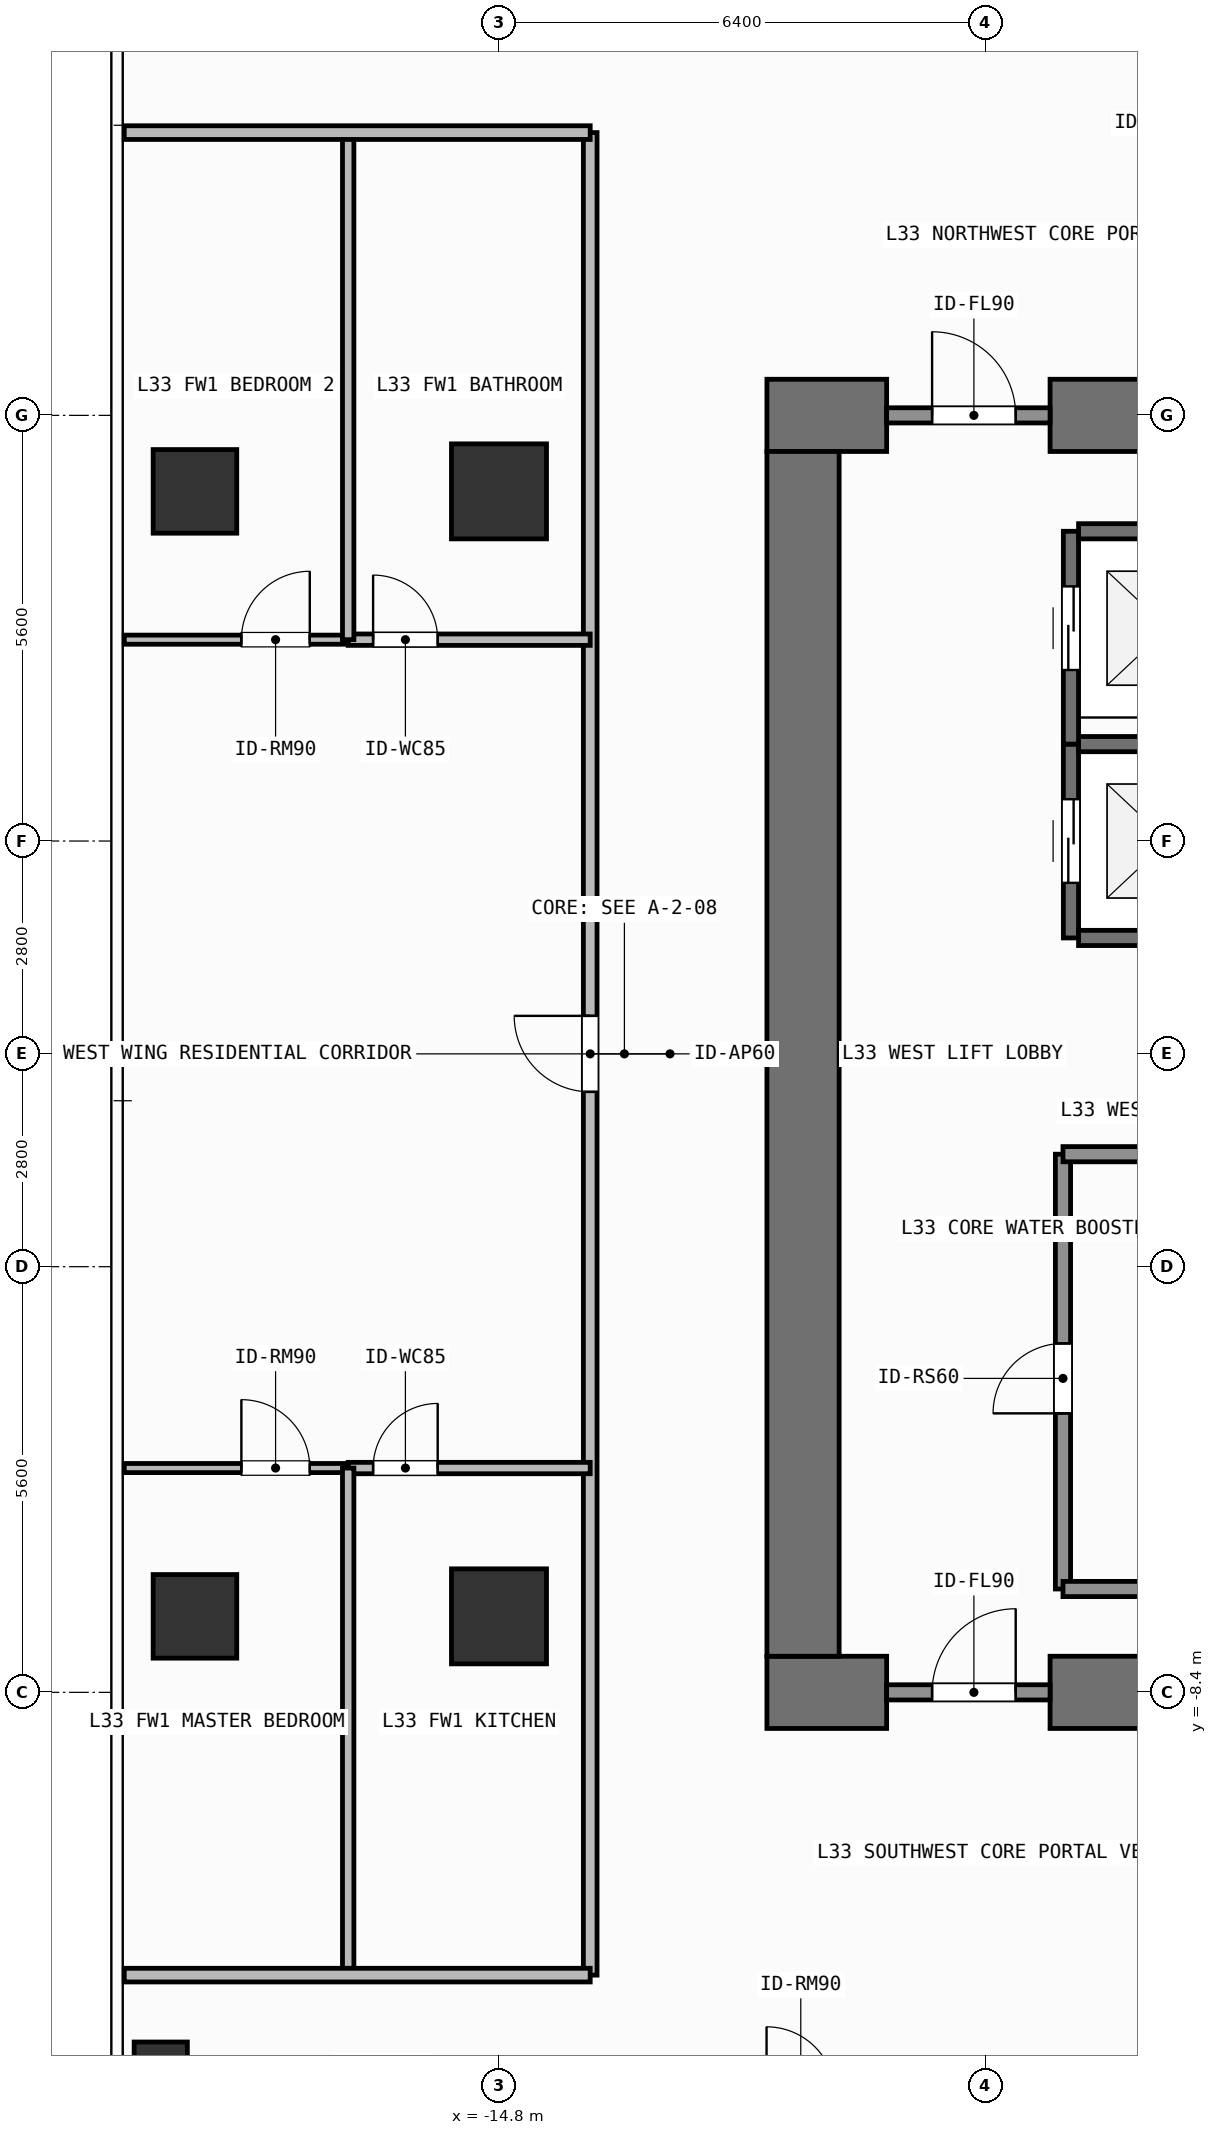
"""IFC4 building model, lengths in metres.
Left out: names, types, materials, properties, quantities, classifications, styles, units other than length and angle.
Written with IfcOpenShell. Run it as: python <this file> out.ifc"""

import sys

from ifc_helpers import new_model, si_unit, direction, frame, frame_2d, origin, origin_2d, place, context, subcontext, project, spatial, rectangle, hollow_rectangle, extrude, element, fill, save


model = new_model("IFC4")
c1 = context("Model", 3, precision=1e-05, world=origin(), true_north=direction((0.0, 1.0)))
c2 = subcontext(c1, "Body", "Model", "MODEL_VIEW")
j1 = project(units=[si_unit("LENGTHUNIT", "METRE"), si_unit("PLANEANGLEUNIT", "RADIAN")], contexts=[c1])
p1 = place(None, origin())
s1 = spatial("IfcSite", under=j1, at=p1, CompositionType="ELEMENT")
p2 = place(p1, origin())
s2 = spatial("IfcBuilding", under=s1, at=p2, CompositionType="ELEMENT")
p3 = place(p2, frame((0.0, 0.0, 132.9)))
s3 = spatial("IfcBuildingStorey", under=s2, at=p3, CompositionType="ELEMENT", Elevation=132.9)
p4 = place(p3, frame((-11.275, -8.4, 0.0), z_axis=(0.0, 0.0, 1.0), x_axis=(1.0, 0.0, 0.0)))
e1 = element("IfcWall", 1, at=p4, inside=s3, PredefinedType="SHEAR", context=c2, shape_type="SweptSolid", body=[
    extrude(rectangle(XDim=1.575, YDim=0.95, at=frame_2d((0.788, 0.0))), origin(), (0.0, 0.0, 1.0), 3.9),
])
p5 = place(p3, frame((-7.55, -8.4, 0.0), z_axis=(0.0, 0.0, 1.0), x_axis=(1.0, 0.0, 0.0)))
e2 = element("IfcWall", 2, at=p5, inside=s3, PredefinedType="SHEAR", context=c2, shape_type="SweptSolid", body=[
    extrude(rectangle(XDim=3.35, YDim=0.95, at=frame_2d((1.675, 0.0))), origin(), (0.0, 0.0, 1.0), 3.9),
])
p6 = place(p3, frame((-11.275, 8.4, 0.0), z_axis=(0.0, 0.0, 1.0), x_axis=(1.0, 0.0, 0.0)))
e3 = element("IfcWall", 3, at=p6, inside=s3, PredefinedType="SHEAR", context=c2, shape_type="SweptSolid", body=[
    extrude(rectangle(XDim=1.575, YDim=0.95, at=frame_2d((0.788, 0.0))), origin(), (0.0, 0.0, 1.0), 3.9),
])
p7 = place(p3, frame((-7.55, 8.4, 0.0), z_axis=(0.0, 0.0, 1.0), x_axis=(1.0, 0.0, 0.0)))
e4 = element("IfcWall", 4, at=p7, inside=s3, PredefinedType="SHEAR", context=c2, shape_type="SweptSolid", body=[
    extrude(rectangle(XDim=16.425, YDim=0.95, at=frame_2d((8.212, 0.0))), origin(), (0.0, 0.0, 1.0), 3.9),
])
p8 = place(p3, frame((-10.8, -7.925, 0.0), z_axis=(0.0, 0.0, 1.0), x_axis=(0.0, 1.0, 0.0)))
e5 = element("IfcWall", 5, at=p8, inside=s3, PredefinedType="SHEAR", context=c2, shape_type="SweptSolid", body=[
    extrude(rectangle(XDim=15.85, YDim=0.95, at=frame_2d((7.925, 0.0))), origin(), (0.0, 0.0, 1.0), 3.9),
])
for number, where, z_axis, x_axis in (
    (6, (-14.8, -7.4, 0.0), (0.0, 0.0, 1.0), (1.0, 0.0, 0.0)),
    (7, (-14.8, 7.4, 0.0), (0.0, 0.0, 1.0), (1.0, 0.0, 0.0)),
):
    element("IfcColumn", number, at=place(p3, frame(where, z_axis=z_axis, x_axis=x_axis)), inside=s3, PredefinedType="COLUMN", context=c2, shape_type="SweptSolid", body=[
        extrude(rectangle(XDim=1.25, YDim=1.25, at=origin_2d()), origin(), (0.0, 0.0, 1.0), 3.9),
    ])
for number, where, z_axis, x_axis in (
    (8, (-18.8, -7.4, 0.0), (0.0, 0.0, 1.0), (1.0, 0.0, 0.0)),
    (9, (-18.8, 7.4, 0.0), (0.0, 0.0, 1.0), (1.0, 0.0, 0.0)),
):
    element("IfcColumn", number, at=place(p3, frame(where, z_axis=z_axis, x_axis=x_axis)), inside=s3, PredefinedType="COLUMN", context=c2, shape_type="SweptSolid", body=[
        extrude(rectangle(XDim=1.1, YDim=1.1, at=origin_2d()), origin(), (0.0, 0.0, 1.0), 3.9),
    ])
p9 = place(p3, frame((-19.25, -13.35, 0.0), z_axis=(0.0, 0.0, 1.0), x_axis=(1.0, 0.0, 0.0)))
e10 = element("IfcColumn", 10, at=p9, inside=s3, PredefinedType="COLUMN", context=c2, shape_type="SweptSolid", body=[
    extrude(hollow_rectangle(XDim=0.7, YDim=0.7, WallThickness=0.032, at=origin_2d()), origin(), (0.0, 0.0, 1.0), 3.9),
])
p10 = place(p3, frame((-7.275, 1.525, 0.0), z_axis=(0.0, 0.0, 1.0), x_axis=(0.0, 1.0, 0.0)))
e11 = element("IfcWall", 11, at=p10, inside=s3, PredefinedType="SHEAR", context=c2, shape_type="SweptSolid", body=[
    extrude(rectangle(XDim=2.55, YDim=0.2, at=frame_2d((1.275, 0.0))), origin(), (0.0, 0.0, 1.0), 3.62),
])
p11 = place(p10, frame((0.725, 0.0, 0.0)))
e12 = element("IfcOpeningElement", 12, at=p11, cuts=e11, PredefinedType="OPENING", context=c2, shape_type="SweptSolid", body=[
    extrude(rectangle(XDim=1.1, YDim=2.2, at=frame_2d((0.55, 1.1))), frame((0.0, 0.11, 0.0), z_axis=(0.0, -1.0, 0.0), x_axis=(1.0, 0.0, 0.0)), (0.0, 0.0, 1.0), 0.22),
])
for number, where, z_axis, x_axis in (
    (13, (-7.175, 1.525, 0.0), (0.0, 0.0, 1.0), (1.0, 0.0, 0.0)),
    (14, (-7.175, 4.075, 0.0), (0.0, 0.0, 1.0), (1.0, 0.0, 0.0)),
):
    element("IfcWall", number, at=place(p3, frame(where, z_axis=z_axis, x_axis=x_axis)), inside=s3, PredefinedType="SHEAR", context=c2, shape_type="SweptSolid", body=[
        extrude(rectangle(XDim=2.35, YDim=0.2, at=frame_2d((1.175, 0.0))), origin(), (0.0, 0.0, 1.0), 3.62),
    ])
p12 = place(p3, frame((-7.275, 4.075, 0.0), z_axis=(0.0, 0.0, 1.0), x_axis=(0.0, 1.0, 0.0)))
e15 = element("IfcWall", 15, at=p12, inside=s3, PredefinedType="SHEAR", context=c2, shape_type="SweptSolid", body=[
    extrude(rectangle(XDim=2.8, YDim=0.2, at=frame_2d((1.4, 0.0))), origin(), (0.0, 0.0, 1.0), 3.62),
])
p13 = place(p12, frame((0.975, 0.0, 0.0)))
e16 = element("IfcOpeningElement", 16, at=p13, cuts=e15, PredefinedType="OPENING", context=c2, shape_type="SweptSolid", body=[
    extrude(rectangle(XDim=1.1, YDim=2.2, at=frame_2d((0.55, 1.1))), frame((0.0, 0.11, 0.0), z_axis=(0.0, -1.0, 0.0), x_axis=(1.0, 0.0, 0.0)), (0.0, 0.0, 1.0), 0.22),
])
p14 = place(p3, frame((-7.175, 6.875, 0.0), z_axis=(0.0, 0.0, 1.0), x_axis=(1.0, 0.0, 0.0)))
e17 = element("IfcWall", 17, at=p14, inside=s3, PredefinedType="SHEAR", context=c2, shape_type="SweptSolid", body=[
    extrude(rectangle(XDim=2.35, YDim=0.2, at=frame_2d((1.175, 0.0))), origin(), (0.0, 0.0, 1.0), 3.62),
])
p15 = place(p3, frame((-9.7, -8.4, 0.0), z_axis=(0.0, 0.0, 1.0), x_axis=(1.0, 0.0, 0.0)))
e18 = element("IfcWall", 18, at=p15, inside=s3, PredefinedType="SOLIDWALL", context=c2, shape_type="SweptSolid", body=[
    extrude(rectangle(XDim=2.15, YDim=0.2, at=frame_2d((1.075, 0.0))), origin(), (0.0, 0.0, 1.0), 2.66),
])
p16 = place(p15, frame((0.598, 0.0, 0.0)))
e19 = element("IfcOpeningElement", 19, at=p16, cuts=e18, PredefinedType="OPENING", context=c2, shape_type="SweptSolid", body=[
    extrude(rectangle(XDim=1.1, YDim=2.15, at=frame_2d((0.55, 1.075))), frame((0.0, 0.11, 0.0), z_axis=(0.0, -1.0, 0.0), x_axis=(1.0, 0.0, 0.0)), (0.0, 0.0, 1.0), 0.22),
])
p17 = place(p3, frame((-9.7, 8.4, 0.0), z_axis=(0.0, 0.0, 1.0), x_axis=(1.0, 0.0, 0.0)))
e20 = element("IfcWall", 20, at=p17, inside=s3, PredefinedType="SOLIDWALL", context=c2, shape_type="SweptSolid", body=[
    extrude(rectangle(XDim=2.15, YDim=0.2, at=frame_2d((1.075, 0.0))), origin(), (0.0, 0.0, 1.0), 2.66),
])
p18 = place(p17, frame((0.598, 0.0, 0.0)))
e21 = element("IfcOpeningElement", 21, at=p18, cuts=e20, PredefinedType="OPENING", context=c2, shape_type="SweptSolid", body=[
    extrude(rectangle(XDim=1.1, YDim=2.15, at=frame_2d((0.55, 1.075))), frame((0.0, 0.11, 0.0), z_axis=(0.0, -1.0, 0.0), x_axis=(1.0, 0.0, 0.0)), (0.0, 0.0, 1.0), 0.22),
])
p19 = place(p3, frame((-7.38, -7.04, 0.0), z_axis=(0.0, 0.0, 1.0), x_axis=(0.0, 1.0, 0.0)))
e22 = element("IfcWall", 22, at=p19, inside=s3, PredefinedType="SOLIDWALL", context=c2, shape_type="SweptSolid", body=[
    extrude(rectangle(XDim=5.72, YDim=0.2, at=frame_2d((2.86, 0.0))), origin(), (0.0, 0.0, 1.0), 3.62),
])
p20 = place(p19, frame((2.31, 0.0, 0.0)))
e23 = element("IfcOpeningElement", 23, at=p20, cuts=e22, PredefinedType="OPENING", context=c2, shape_type="SweptSolid", body=[
    extrude(rectangle(XDim=0.92, YDim=2.1, at=frame_2d((0.46, 1.05))), frame((0.0, 0.11, 0.0), z_axis=(0.0, -1.0, 0.0), x_axis=(1.0, 0.0, 0.0)), (0.0, 0.0, 1.0), 0.22),
])
p21 = place(p3, frame((-13.6, -12.12, 0.0), z_axis=(0.0, 0.0, 1.0), x_axis=(0.0, 1.0, 0.0)))
e24 = element("IfcWall", 24, at=p21, inside=s3, PredefinedType="PARTITIONING", context=c2, shape_type="SweptSolid", body=[
    extrude(rectangle(XDim=24.24, YDim=0.18, at=frame_2d((12.12, 0.0))), origin(), (0.0, 0.0, 1.0), 3.62),
])
p22 = place(p21, frame((11.62, 0.0, 0.0)))
e25 = element("IfcOpeningElement", 25, at=p22, cuts=e24, PredefinedType="OPENING", context=c2, shape_type="SweptSolid", body=[
    extrude(rectangle(XDim=1.0, YDim=2.2, at=frame_2d((0.5, 1.1))), frame((0.0, 0.1, 0.0), z_axis=(0.0, -1.0, 0.0), x_axis=(1.0, 0.0, 0.0)), (0.0, 0.0, 1.0), 0.2),
])
p23 = place(p3, frame((-16.784, 5.449, 0.0), z_axis=(0.0, 0.0, 1.0), x_axis=(1.0, 0.0, 0.0)))
e26 = element("IfcWall", 26, at=p23, inside=s3, PredefinedType="PARTITIONING", context=c2, shape_type="SweptSolid", body=[
    extrude(rectangle(XDim=3.184, YDim=0.15, at=frame_2d((1.592, 0.0))), origin(), (0.0, 0.0, 1.0), 3.62),
])
p24 = place(p23, frame((0.328, 0.0, 0.0)))
e27 = element("IfcOpeningElement", 27, at=p24, cuts=e26, PredefinedType="OPENING", context=c2, shape_type="SweptSolid", body=[
    extrude(rectangle(XDim=0.85, YDim=2.1, at=frame_2d((0.425, 1.05))), frame((0.0, 0.085, 0.0), z_axis=(0.0, -1.0, 0.0), x_axis=(1.0, 0.0, 0.0)), (0.0, 0.0, 1.0), 0.17),
])
p25 = place(p3, frame((-16.784, -5.449, 0.0), z_axis=(0.0, 0.0, 1.0), x_axis=(1.0, 0.0, 0.0)))
e28 = element("IfcWall", 28, at=p25, inside=s3, PredefinedType="PARTITIONING", context=c2, shape_type="SweptSolid", body=[
    extrude(rectangle(XDim=3.184, YDim=0.15, at=frame_2d((1.592, 0.0))), origin(), (0.0, 0.0, 1.0), 3.62),
])
p26 = place(p25, frame((0.328, 0.0, 0.0)))
e29 = element("IfcOpeningElement", 29, at=p26, cuts=e28, PredefinedType="OPENING", context=c2, shape_type="SweptSolid", body=[
    extrude(rectangle(XDim=0.85, YDim=2.1, at=frame_2d((0.425, 1.05))), frame((0.0, 0.085, 0.0), z_axis=(0.0, -1.0, 0.0), x_axis=(1.0, 0.0, 0.0)), (0.0, 0.0, 1.0), 0.17),
])
p27 = place(p3, frame((-19.73, -5.449, 0.0), z_axis=(0.0, 0.0, 1.0), x_axis=(1.0, 0.0, 0.0)))
e30 = element("IfcWall", 30, at=p27, inside=s3, PredefinedType="PARTITIONING", context=c2, shape_type="SweptSolid", body=[
    extrude(rectangle(XDim=2.946, YDim=0.12, at=frame_2d((1.473, 0.0))), origin(), (0.0, 0.0, 1.0), 3.62),
])
p28 = place(p27, frame((1.541, 0.0, 0.0)))
e31 = element("IfcOpeningElement", 31, at=p28, cuts=e30, PredefinedType="OPENING", context=c2, shape_type="SweptSolid", body=[
    extrude(rectangle(XDim=0.9, YDim=2.1, at=frame_2d((0.45, 1.05))), frame((0.0, 0.07, 0.0), z_axis=(0.0, -1.0, 0.0), x_axis=(1.0, 0.0, 0.0)), (0.0, 0.0, 1.0), 0.14),
])
p29 = place(p3, frame((-19.73, 5.449, 0.0), z_axis=(0.0, 0.0, 1.0), x_axis=(1.0, 0.0, 0.0)))
e32 = element("IfcWall", 32, at=p29, inside=s3, PredefinedType="PARTITIONING", context=c2, shape_type="SweptSolid", body=[
    extrude(rectangle(XDim=2.946, YDim=0.12, at=frame_2d((1.473, 0.0))), origin(), (0.0, 0.0, 1.0), 3.62),
])
p30 = place(p29, frame((1.541, 0.0, 0.0)))
e33 = element("IfcOpeningElement", 33, at=p30, cuts=e32, PredefinedType="OPENING", context=c2, shape_type="SweptSolid", body=[
    extrude(rectangle(XDim=0.9, YDim=2.1, at=frame_2d((0.45, 1.05))), frame((0.0, 0.07, 0.0), z_axis=(0.0, -1.0, 0.0), x_axis=(1.0, 0.0, 0.0)), (0.0, 0.0, 1.0), 0.14),
])
p31 = place(p3, frame((-7.38, -1.32, 0.0), z_axis=(0.0, 0.0, 1.0), x_axis=(1.0, 0.0, 0.0)))
e34 = element("IfcWall", 34, at=p31, inside=s3, PredefinedType="SOLIDWALL", context=c2, shape_type="SweptSolid", body=[
    extrude(rectangle(XDim=2.91, YDim=0.2, at=frame_2d((1.455, 0.0))), origin(), (0.0, 0.0, 1.0), 3.62),
])
p32 = place(p3, frame((-7.38, -7.04, 0.0), z_axis=(0.0, 0.0, 1.0), x_axis=(1.0, 0.0, 0.0)))
e35 = element("IfcWall", 35, at=p32, inside=s3, PredefinedType="SOLIDWALL", context=c2, shape_type="SweptSolid", body=[
    extrude(rectangle(XDim=2.8, YDim=0.2, at=frame_2d((1.4, 0.0))), origin(), (0.0, 0.0, 1.0), 3.62),
])
for number, where, z_axis, x_axis in (
    (36, (-16.784, -12.12, 0.0), (0.0, 0.0, 1.0), (0.0, 1.0, 0.0)),
    (37, (-16.784, 5.449, 0.0), (0.0, 0.0, 1.0), (0.0, 1.0, 0.0)),
):
    element("IfcWall", number, at=place(p3, frame(where, z_axis=z_axis, x_axis=x_axis)), inside=s3, PredefinedType="PARTITIONING", context=c2, shape_type="SweptSolid", body=[
        extrude(rectangle(XDim=6.671, YDim=0.15, at=frame_2d((3.335, 0.0))), origin(), (0.0, 0.0, 1.0), 3.62),
    ])
for number, where, z_axis, x_axis in (
    (38, (-19.73, -12.12, 0.0), (0.0, 0.0, 1.0), (1.0, 0.0, 0.0)),
    (39, (-19.73, 12.12, 0.0), (0.0, 0.0, 1.0), (1.0, 0.0, 0.0)),
):
    element("IfcWall", number, at=place(p3, frame(where, z_axis=z_axis, x_axis=x_axis)), inside=s3, PredefinedType="PARTITIONING", context=c2, shape_type="SweptSolid", body=[
        extrude(rectangle(XDim=6.13, YDim=0.18, at=frame_2d((3.065, 0.0))), origin(), (0.0, 0.0, 1.0), 3.62),
    ])
p33 = place(p11, origin())
e40 = element("IfcDoor", 40, at=p33, inside=s3, OperationType="SLIDING_TO_LEFT", PredefinedType="DOOR", context=c2, shape_type="SweptSolid", body=[
    extrude(rectangle(XDim=1.1, YDim=2.2, at=frame_2d((0.55, 1.1))), frame((0.0, 0.025, 0.0), z_axis=(0.0, -1.0, 0.0), x_axis=(1.0, 0.0, 0.0)), (0.0, 0.0, 1.0), 0.05),
])
fill(e12, e40)
p34 = place(p13, origin())
e41 = element("IfcDoor", 41, at=p34, inside=s3, OperationType="SLIDING_TO_LEFT", PredefinedType="DOOR", context=c2, shape_type="SweptSolid", body=[
    extrude(rectangle(XDim=1.1, YDim=2.2, at=frame_2d((0.55, 1.1))), frame((0.0, 0.025, 0.0), z_axis=(0.0, -1.0, 0.0), x_axis=(1.0, 0.0, 0.0)), (0.0, 0.0, 1.0), 0.05),
])
fill(e16, e41)
p35 = place(p16, origin())
e42 = element("IfcDoor", 42, at=p35, inside=s3, OperationType="SINGLE_SWING_RIGHT", PredefinedType="DOOR", context=c2, shape_type="SweptSolid", body=[
    extrude(rectangle(XDim=1.1, YDim=2.15, at=frame_2d((0.55, 1.075))), frame((0.0, 0.025, 0.0), z_axis=(0.0, -1.0, 0.0), x_axis=(1.0, 0.0, 0.0)), (0.0, 0.0, 1.0), 0.05),
])
fill(e19, e42)
p36 = place(p18, origin())
e43 = element("IfcDoor", 43, at=p36, inside=s3, OperationType="SINGLE_SWING_LEFT", PredefinedType="DOOR", context=c2, shape_type="SweptSolid", body=[
    extrude(rectangle(XDim=1.1, YDim=2.15, at=frame_2d((0.55, 1.075))), frame((0.0, 0.025, 0.0), z_axis=(0.0, -1.0, 0.0), x_axis=(1.0, 0.0, 0.0)), (0.0, 0.0, 1.0), 0.05),
])
fill(e21, e43)
p37 = place(p20, origin())
e44 = element("IfcDoor", 44, at=p37, inside=s3, OperationType="SINGLE_SWING_LEFT", PredefinedType="DOOR", context=c2, shape_type="SweptSolid", body=[
    extrude(rectangle(XDim=0.92, YDim=2.1, at=frame_2d((0.46, 1.05))), frame((0.0, 0.025, 0.0), z_axis=(0.0, -1.0, 0.0), x_axis=(1.0, 0.0, 0.0)), (0.0, 0.0, 1.0), 0.05),
])
fill(e23, e44)
p38 = place(p22, origin())
e45 = element("IfcDoor", 45, at=p38, inside=s3, OperationType="SINGLE_SWING_RIGHT", PredefinedType="DOOR", context=c2, shape_type="SweptSolid", body=[
    extrude(rectangle(XDim=1.0, YDim=2.2, at=frame_2d((0.5, 1.1))), frame((0.0, 0.025, 0.0), z_axis=(0.0, -1.0, 0.0), x_axis=(1.0, 0.0, 0.0)), (0.0, 0.0, 1.0), 0.05),
])
fill(e25, e45)
p39 = place(p24, origin())
e46 = element("IfcDoor", 46, at=p39, inside=s3, OperationType="SINGLE_SWING_LEFT", PredefinedType="DOOR", context=c2, shape_type="SweptSolid", body=[
    extrude(rectangle(XDim=0.85, YDim=2.1, at=frame_2d((0.425, 1.05))), frame((0.0, 0.025, 0.0), z_axis=(0.0, -1.0, 0.0), x_axis=(1.0, 0.0, 0.0)), (0.0, 0.0, 1.0), 0.05),
])
fill(e27, e46)
p40 = place(p26, origin())
e47 = element("IfcDoor", 47, at=p40, inside=s3, OperationType="SINGLE_SWING_RIGHT", PredefinedType="DOOR", context=c2, shape_type="SweptSolid", body=[
    extrude(rectangle(XDim=0.85, YDim=2.1, at=frame_2d((0.425, 1.05))), frame((0.0, 0.025, 0.0), z_axis=(0.0, -1.0, 0.0), x_axis=(1.0, 0.0, 0.0)), (0.0, 0.0, 1.0), 0.05),
])
fill(e29, e47)
p41 = place(p28, origin())
e48 = element("IfcDoor", 48, at=p41, inside=s3, OperationType="SINGLE_SWING_LEFT", PredefinedType="DOOR", context=c2, shape_type="SweptSolid", body=[
    extrude(rectangle(XDim=0.9, YDim=2.1, at=frame_2d((0.45, 1.05))), frame((0.0, 0.025, 0.0), z_axis=(0.0, -1.0, 0.0), x_axis=(1.0, 0.0, 0.0)), (0.0, 0.0, 1.0), 0.05),
])
fill(e31, e48)
p42 = place(p30, origin())
e49 = element("IfcDoor", 49, at=p42, inside=s3, OperationType="SINGLE_SWING_RIGHT", PredefinedType="DOOR", context=c2, shape_type="SweptSolid", body=[
    extrude(rectangle(XDim=0.9, YDim=2.1, at=frame_2d((0.45, 1.05))), frame((0.0, 0.025, 0.0), z_axis=(0.0, -1.0, 0.0), x_axis=(1.0, 0.0, 0.0)), (0.0, 0.0, 1.0), 0.05),
])
fill(e33, e49)
save(model, sys.argv[1])
